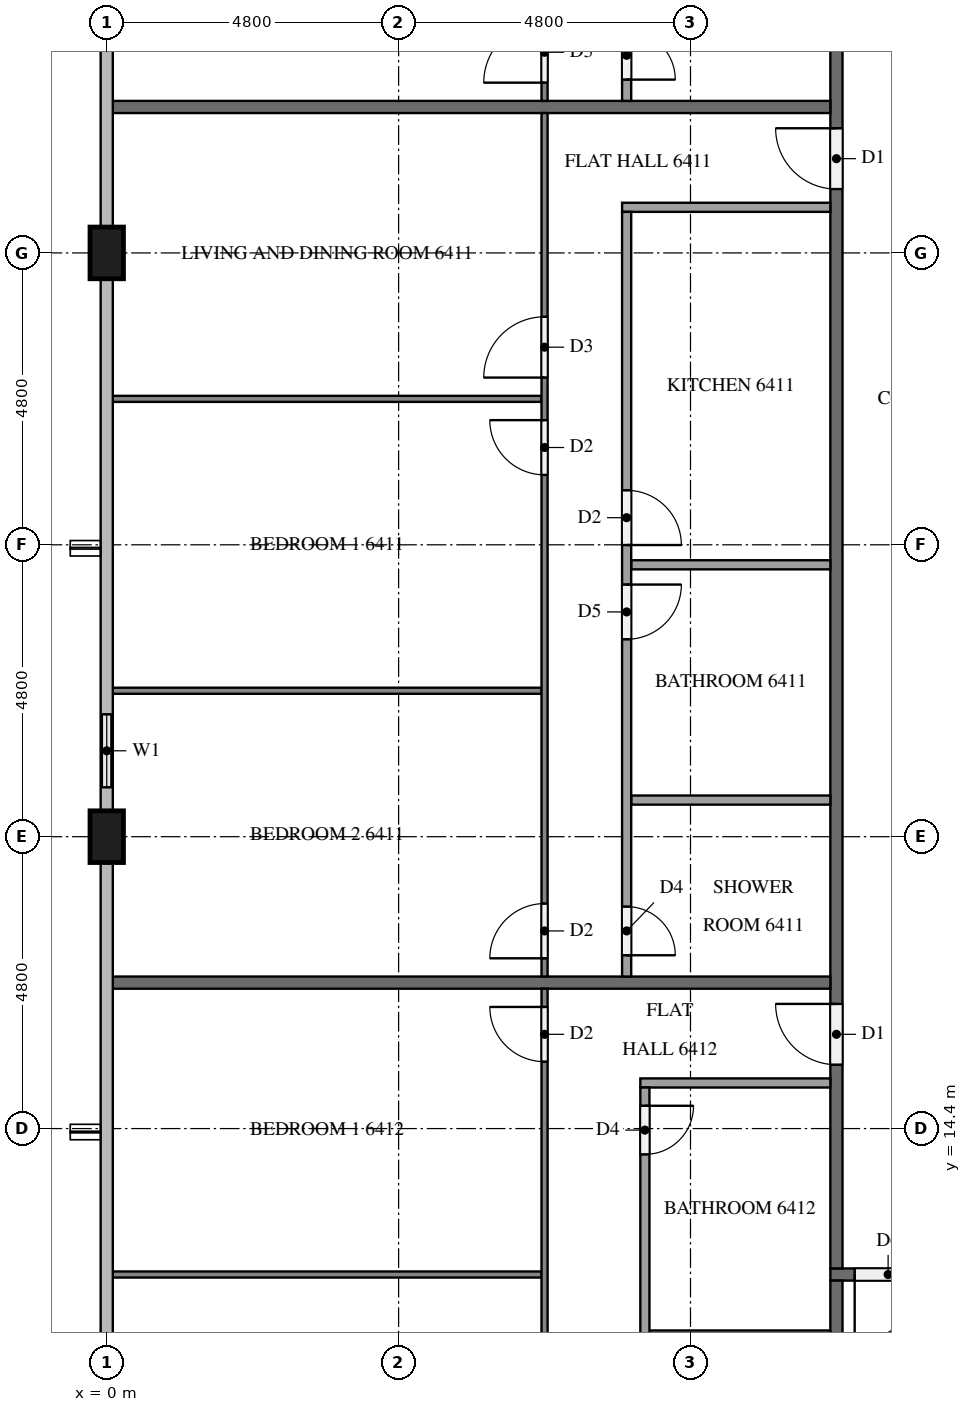
"""IFC4 building model, lengths in metres.
Left out: names, types, materials, properties, quantities, classifications, styles, units other than length and angle.
Written with IfcOpenShell. Run it as: python <this file> out.ifc"""

import sys

from ifc_helpers import new_model, si_unit, direction, frame, frame_2d, origin, origin_2d, place, context, subcontext, project, spatial, rectangle, extrude, element, fill, save


model = new_model("IFC4")
c1 = context("Model", 3, precision=1e-05, world=origin(), true_north=direction((0.0, 1.0)))
c2 = subcontext(c1, "Body", "Model", "MODEL_VIEW")
j1 = project(units=[si_unit("LENGTHUNIT", "METRE"), si_unit("PLANEANGLEUNIT", "RADIAN")], contexts=[c1])
p1 = place(None, origin())
s1 = spatial("IfcSite", under=j1, at=p1, CompositionType="ELEMENT")
p2 = place(p1, origin())
s2 = spatial("IfcBuilding", under=s1, at=p2, CompositionType="ELEMENT")
p3 = place(p2, frame((0.0, 0.0, 245.7)))
s3 = spatial("IfcBuildingStorey", under=s2, at=p3, CompositionType="ELEMENT", Elevation=245.7)
for number, where, z_axis, x_axis in (
    (1, (0.0, 28.8, 0.0), (0.0, 0.0, 1.0), (0.0, 1.0, 0.0)),
    (2, (0.0, 19.2, 0.0), (0.0, 0.0, 1.0), (0.0, 1.0, 0.0)),
):
    element("IfcColumn", number, at=place(p3, frame(where, z_axis=z_axis, x_axis=x_axis)), inside=s3, PredefinedType="COLUMN", context=c2, shape_type="SweptSolid", body=[
        extrude(rectangle(XDim=0.85, YDim=0.55, at=origin_2d()), origin(), (0.0, 0.0, 1.0), 3.2),
    ])
p4 = place(p3, frame((0.0, 21.6, 0.0), z_axis=(0.0, 0.0, 1.0), x_axis=(0.0, -1.0, 0.0)))
e3 = element("IfcWall", 3, at=p4, inside=s3, PredefinedType="SOLIDWALL", context=c2, shape_type="SweptSolid", body=[
    extrude(rectangle(XDim=1.975, YDim=0.15, at=frame_2d((0.988, 0.0))), origin(), (0.0, 0.0, 1.0), 3.2),
])
p5 = place(p4, frame((0.387, 0.0, 0.9)))
e4 = element("IfcOpeningElement", 4, at=p5, cuts=e3, PredefinedType="OPENING", context=c2, shape_type="SweptSolid", body=[
    extrude(rectangle(XDim=1.2, YDim=1.4, at=frame_2d((0.6, 0.7))), frame((0.0, 0.085, 0.0), z_axis=(0.0, -1.0, 0.0), x_axis=(1.0, 0.0, 0.0)), (0.0, 0.0, 1.0), 0.17),
])
p6 = place(p3, frame((50.5, 12.0, 0.0), z_axis=(0.0, 0.0, 1.0), x_axis=(-1.0, 0.0, 0.0)))
e5 = element("IfcWall", 5, at=p6, inside=s3, PredefinedType="PARTITIONING", context=c2, shape_type="SweptSolid", body=[
    extrude(rectangle(XDim=38.6, YDim=0.2, at=frame_2d((19.3, 0.0))), origin(), (0.0, 0.0, 1.0), 3.2),
])
p7 = place(p6, frame((37.1, 0.0, 0.0)))
e6 = element("IfcOpeningElement", 6, at=p7, cuts=e5, PredefinedType="OPENING", context=c2, shape_type="SweptSolid", body=[
    extrude(rectangle(XDim=1.1, YDim=2.1, at=frame_2d((0.55, 1.05))), frame((0.0, 0.11, 0.0), z_axis=(0.0, -1.0, 0.0), x_axis=(1.0, 0.0, 0.0)), (0.0, 0.0, 1.0), 0.22),
])
p8 = place(p6, frame((17.95, 0.0, 0.0)))
e7 = element("IfcOpeningElement", 7, at=p8, cuts=e5, PredefinedType="OPENING", context=c2, shape_type="SweptSolid", body=[
    extrude(rectangle(XDim=1.0, YDim=2.1, at=frame_2d((0.5, 1.05))), frame((0.0, 0.11, 0.0), z_axis=(0.0, -1.0, 0.0), x_axis=(1.0, 0.0, 0.0)), (0.0, 0.0, 1.0), 0.22),
])
p9 = place(p6, frame((8.35, 0.0, 0.0)))
e8 = element("IfcOpeningElement", 8, at=p9, cuts=e5, PredefinedType="OPENING", context=c2, shape_type="SweptSolid", body=[
    extrude(rectangle(XDim=1.0, YDim=2.1, at=frame_2d((0.5, 1.05))), frame((0.0, 0.11, 0.0), z_axis=(0.0, -1.0, 0.0), x_axis=(1.0, 0.0, 0.0)), (0.0, 0.0, 1.0), 0.22),
])
p10 = place(p3, frame((12.0, 12.1, 0.0), z_axis=(0.0, 0.0, 1.0), x_axis=(0.0, 1.0, 0.0)))
e9 = element("IfcWall", 9, at=p10, inside=s3, PredefinedType="PARTITIONING", context=c2, shape_type="SweptSolid", body=[
    extrude(rectangle(XDim=28.6, YDim=0.2, at=frame_2d((14.3, 0.0))), origin(), (0.0, 0.0, 1.0), 3.2),
])
p11 = place(p10, frame((27.35, 0.0, 0.0)))
e10 = element("IfcOpeningElement", 10, at=p11, cuts=e9, PredefinedType="OPENING", context=c2, shape_type="SweptSolid", body=[
    extrude(rectangle(XDim=1.0, YDim=2.1, at=frame_2d((0.5, 1.05))), frame((0.0, 0.11, 0.0), z_axis=(0.0, -1.0, 0.0), x_axis=(1.0, 0.0, 0.0)), (0.0, 0.0, 1.0), 0.22),
])
p12 = place(p10, frame((17.75, 0.0, 0.0)))
e11 = element("IfcOpeningElement", 11, at=p12, cuts=e9, PredefinedType="OPENING", context=c2, shape_type="SweptSolid", body=[
    extrude(rectangle(XDim=1.0, YDim=2.1, at=frame_2d((0.5, 1.05))), frame((0.0, 0.11, 0.0), z_axis=(0.0, -1.0, 0.0), x_axis=(1.0, 0.0, 0.0)), (0.0, 0.0, 1.0), 0.22),
])
p13 = place(p10, frame((3.35, 0.0, 0.0)))
e12 = element("IfcOpeningElement", 12, at=p13, cuts=e9, PredefinedType="OPENING", context=c2, shape_type="SweptSolid", body=[
    extrude(rectangle(XDim=1.0, YDim=2.1, at=frame_2d((0.5, 1.05))), frame((0.0, 0.11, 0.0), z_axis=(0.0, -1.0, 0.0), x_axis=(1.0, 0.0, 0.0)), (0.0, 0.0, 1.0), 0.22),
])
p14 = place(p3, frame((12.0, 4.9, 0.0), z_axis=(0.0, 0.0, 1.0), x_axis=(0.0, 1.0, 0.0)))
e13 = element("IfcWall", 13, at=p14, inside=s3, PredefinedType="PARTITIONING", context=c2, shape_type="SweptSolid", body=[
    extrude(rectangle(XDim=7.0, YDim=0.2, at=frame_2d((3.5, 0.0))), origin(), (0.0, 0.0, 1.0), 3.2),
])
for number, where, z_axis, x_axis in (
    (14, (0.1, 31.2, 0.0), (0.0, 0.0, 1.0), (1.0, 0.0, 0.0)),
    (15, (0.1, 16.8, 0.0), (0.0, 0.0, 1.0), (1.0, 0.0, 0.0)),
):
    element("IfcWall", number, at=place(p3, frame(where, z_axis=z_axis, x_axis=x_axis)), inside=s3, PredefinedType="PARTITIONING", context=c2, shape_type="SweptSolid", body=[
        extrude(rectangle(XDim=11.8, YDim=0.2, at=frame_2d((5.9, 0.0))), origin(), (0.0, 0.0, 1.0), 3.2),
    ])
p15 = place(p3, frame((7.2, 31.3, 0.0), z_axis=(0.0, 0.0, 1.0), x_axis=(0.0, 1.0, 0.0)))
e16 = element("IfcWall", 16, at=p15, inside=s3, PredefinedType="PARTITIONING", context=c2, shape_type="SweptSolid", body=[
    extrude(rectangle(XDim=9.4, YDim=0.1, at=frame_2d((4.7, 0.0))), origin(), (0.0, 0.0, 1.0), 3.2),
])
p16 = place(p15, frame((8.2, 0.0, 0.0)))
e17 = element("IfcOpeningElement", 17, at=p16, cuts=e16, PredefinedType="OPENING", context=c2, shape_type="SweptSolid", body=[
    extrude(rectangle(XDim=0.9, YDim=2.1, at=frame_2d((0.45, 1.05))), frame((0.0, 0.06, 0.0), z_axis=(0.0, -1.0, 0.0), x_axis=(1.0, 0.0, 0.0)), (0.0, 0.0, 1.0), 0.12),
])
p17 = place(p15, frame((0.3, 0.0, 0.0)))
e18 = element("IfcOpeningElement", 18, at=p17, cuts=e16, PredefinedType="OPENING", context=c2, shape_type="SweptSolid", body=[
    extrude(rectangle(XDim=1.0, YDim=2.1, at=frame_2d((0.5, 1.05))), frame((0.0, 0.06, 0.0), z_axis=(0.0, -1.0, 0.0), x_axis=(1.0, 0.0, 0.0)), (0.0, 0.0, 1.0), 0.12),
])
p18 = place(p3, frame((8.55, 39.075, 0.0), z_axis=(0.0, 0.0, 1.0), x_axis=(0.0, -1.0, 0.0)))
e19 = element("IfcWall", 19, at=p18, inside=s3, PredefinedType="PARTITIONING", context=c2, shape_type="SweptSolid", body=[
    extrude(rectangle(XDim=7.775, YDim=0.15, at=frame_2d((3.887, 0.0))), origin(), (0.0, 0.0, 1.0), 3.2),
])
p19 = place(p18, frame((0.3, 0.0, 0.0)))
e20 = element("IfcOpeningElement", 20, at=p19, cuts=e19, PredefinedType="OPENING", context=c2, shape_type="SweptSolid", body=[
    extrude(rectangle(XDim=0.9, YDim=2.1, at=frame_2d((0.45, 1.05))), frame((0.0, 0.085, 0.0), z_axis=(0.0, -1.0, 0.0), x_axis=(1.0, 0.0, 0.0)), (0.0, 0.0, 1.0), 0.17),
])
p20 = place(p18, frame((6.625, 0.0, 0.0)))
e21 = element("IfcOpeningElement", 21, at=p20, cuts=e19, PredefinedType="OPENING", context=c2, shape_type="SweptSolid", body=[
    extrude(rectangle(XDim=0.8, YDim=2.1, at=frame_2d((0.4, 1.05))), frame((0.0, 0.085, 0.0), z_axis=(0.0, -1.0, 0.0), x_axis=(1.0, 0.0, 0.0)), (0.0, 0.0, 1.0), 0.17),
])
for number, where, z_axis, x_axis in (
    (22, (7.15, 26.4, 0.0), (0.0, 0.0, 1.0), (-1.0, 0.0, 0.0)),
    (23, (7.15, 21.6, 0.0), (0.0, 0.0, 1.0), (-1.0, 0.0, 0.0)),
):
    element("IfcWall", number, at=place(p3, frame(where, z_axis=z_axis, x_axis=x_axis)), inside=s3, PredefinedType="PARTITIONING", context=c2, shape_type="SweptSolid", body=[
        extrude(rectangle(XDim=7.05, YDim=0.1, at=frame_2d((3.525, 0.0))), origin(), (0.0, 0.0, 1.0), 3.2),
    ])
p21 = place(p3, frame((7.2, 16.9, 0.0), z_axis=(0.0, 0.0, 1.0), x_axis=(0.0, 1.0, 0.0)))
e24 = element("IfcWall", 24, at=p21, inside=s3, PredefinedType="PARTITIONING", context=c2, shape_type="SweptSolid", body=[
    extrude(rectangle(XDim=14.2, YDim=0.1, at=frame_2d((7.1, 0.0))), origin(), (0.0, 0.0, 1.0), 3.2),
])
p22 = place(p21, frame((9.85, 0.0, 0.0)))
e25 = element("IfcOpeningElement", 25, at=p22, cuts=e24, PredefinedType="OPENING", context=c2, shape_type="SweptSolid", body=[
    extrude(rectangle(XDim=1.0, YDim=2.1, at=frame_2d((0.5, 1.05))), frame((0.0, 0.06, 0.0), z_axis=(0.0, -1.0, 0.0), x_axis=(1.0, 0.0, 0.0)), (0.0, 0.0, 1.0), 0.12),
])
p23 = place(p21, frame((8.25, 0.0, 0.0)))
e26 = element("IfcOpeningElement", 26, at=p23, cuts=e24, PredefinedType="OPENING", context=c2, shape_type="SweptSolid", body=[
    extrude(rectangle(XDim=0.9, YDim=2.1, at=frame_2d((0.45, 1.05))), frame((0.0, 0.06, 0.0), z_axis=(0.0, -1.0, 0.0), x_axis=(1.0, 0.0, 0.0)), (0.0, 0.0, 1.0), 0.12),
])
p24 = place(p21, frame((0.3, 0.0, 0.0)))
e27 = element("IfcOpeningElement", 27, at=p24, cuts=e24, PredefinedType="OPENING", context=c2, shape_type="SweptSolid", body=[
    extrude(rectangle(XDim=0.9, YDim=2.1, at=frame_2d((0.45, 1.05))), frame((0.0, 0.06, 0.0), z_axis=(0.0, -1.0, 0.0), x_axis=(1.0, 0.0, 0.0)), (0.0, 0.0, 1.0), 0.12),
])
for number, where, z_axis, x_axis in (
    (28, (11.9, 23.671, 0.0), (0.0, 0.0, 1.0), (-1.0, 0.0, 0.0)),
    (29, (11.9, 19.802, 0.0), (0.0, 0.0, 1.0), (-1.0, 0.0, 0.0)),
):
    element("IfcWall", number, at=place(p3, frame(where, z_axis=z_axis, x_axis=x_axis)), inside=s3, PredefinedType="PARTITIONING", context=c2, shape_type="SweptSolid", body=[
        extrude(rectangle(XDim=3.275, YDim=0.15, at=frame_2d((1.637, 0.0))), origin(), (0.0, 0.0, 1.0), 3.2),
    ])
p25 = place(p3, frame((11.9, 29.55, 0.0), z_axis=(0.0, 0.0, 1.0), x_axis=(-1.0, 0.0, 0.0)))
e30 = element("IfcWall", 30, at=p25, inside=s3, PredefinedType="PARTITIONING", context=c2, shape_type="SweptSolid", body=[
    extrude(rectangle(XDim=3.425, YDim=0.15, at=frame_2d((1.712, 0.0))), origin(), (0.0, 0.0, 1.0), 3.2),
])
p26 = place(p3, frame((8.55, 29.475, 0.0), z_axis=(0.0, 0.0, 1.0), x_axis=(0.0, -1.0, 0.0)))
e31 = element("IfcWall", 31, at=p26, inside=s3, PredefinedType="PARTITIONING", context=c2, shape_type="SweptSolid", body=[
    extrude(rectangle(XDim=12.575, YDim=0.15, at=frame_2d((6.288, 0.0))), origin(), (0.0, 0.0, 1.0), 3.2),
])
p27 = place(p26, frame((4.579, 0.0, 0.0)))
e32 = element("IfcOpeningElement", 32, at=p27, cuts=e31, PredefinedType="OPENING", context=c2, shape_type="SweptSolid", body=[
    extrude(rectangle(XDim=0.9, YDim=2.1, at=frame_2d((0.45, 1.05))), frame((0.0, 0.085, 0.0), z_axis=(0.0, -1.0, 0.0), x_axis=(1.0, 0.0, 0.0)), (0.0, 0.0, 1.0), 0.17),
])
p28 = place(p26, frame((6.129, 0.0, 0.0)))
e33 = element("IfcOpeningElement", 33, at=p28, cuts=e31, PredefinedType="OPENING", context=c2, shape_type="SweptSolid", body=[
    extrude(rectangle(XDim=0.9, YDim=2.1, at=frame_2d((0.45, 1.05))), frame((0.0, 0.085, 0.0), z_axis=(0.0, -1.0, 0.0), x_axis=(1.0, 0.0, 0.0)), (0.0, 0.0, 1.0), 0.17),
])
p29 = place(p26, frame((11.425, 0.0, 0.0)))
e34 = element("IfcOpeningElement", 34, at=p29, cuts=e31, PredefinedType="OPENING", context=c2, shape_type="SweptSolid", body=[
    extrude(rectangle(XDim=0.8, YDim=2.1, at=frame_2d((0.4, 1.05))), frame((0.0, 0.085, 0.0), z_axis=(0.0, -1.0, 0.0), x_axis=(1.0, 0.0, 0.0)), (0.0, 0.0, 1.0), 0.17),
])
p30 = place(p3, frame((7.15, 12.0, 0.0), z_axis=(0.0, 0.0, 1.0), x_axis=(-1.0, 0.0, 0.0)))
e35 = element("IfcWall", 35, at=p30, inside=s3, PredefinedType="PARTITIONING", context=c2, shape_type="SweptSolid", body=[
    extrude(rectangle(XDim=7.05, YDim=0.1, at=frame_2d((3.525, 0.0))), origin(), (0.0, 0.0, 1.0), 3.2),
])
p31 = place(p3, frame((7.2, 4.9, 0.0), z_axis=(0.0, 0.0, 1.0), x_axis=(0.0, 1.0, 0.0)))
e36 = element("IfcWall", 36, at=p31, inside=s3, PredefinedType="PARTITIONING", context=c2, shape_type="SweptSolid", body=[
    extrude(rectangle(XDim=11.8, YDim=0.1, at=frame_2d((5.9, 0.0))), origin(), (0.0, 0.0, 1.0), 3.2),
])
p32 = place(p31, frame((10.6, 0.0, 0.0)))
e37 = element("IfcOpeningElement", 37, at=p32, cuts=e36, PredefinedType="OPENING", context=c2, shape_type="SweptSolid", body=[
    extrude(rectangle(XDim=0.9, YDim=2.1, at=frame_2d((0.45, 1.05))), frame((0.0, 0.06, 0.0), z_axis=(0.0, -1.0, 0.0), x_axis=(1.0, 0.0, 0.0)), (0.0, 0.0, 1.0), 0.12),
])
p33 = place(p31, frame((0.3, 0.0, 0.0)))
e38 = element("IfcOpeningElement", 38, at=p33, cuts=e36, PredefinedType="OPENING", context=c2, shape_type="SweptSolid", body=[
    extrude(rectangle(XDim=1.0, YDim=2.1, at=frame_2d((0.5, 1.05))), frame((0.0, 0.06, 0.0), z_axis=(0.0, -1.0, 0.0), x_axis=(1.0, 0.0, 0.0)), (0.0, 0.0, 1.0), 0.12),
])
p34 = place(p3, frame((11.9, 11.005, 0.0), z_axis=(0.0, 0.0, 1.0), x_axis=(-1.0, 0.0, 0.0)))
e39 = element("IfcWall", 39, at=p34, inside=s3, PredefinedType="PARTITIONING", context=c2, shape_type="SweptSolid", body=[
    extrude(rectangle(XDim=2.975, YDim=0.15, at=frame_2d((1.487, 0.0))), origin(), (0.0, 0.0, 1.0), 3.2),
])
p35 = place(p3, frame((11.9, 15.15, 0.0), z_axis=(0.0, 0.0, 1.0), x_axis=(-1.0, 0.0, 0.0)))
e40 = element("IfcWall", 40, at=p35, inside=s3, PredefinedType="PARTITIONING", context=c2, shape_type="SweptSolid", body=[
    extrude(rectangle(XDim=3.125, YDim=0.15, at=frame_2d((1.562, 0.0))), origin(), (0.0, 0.0, 1.0), 3.2),
])
p36 = place(p3, frame((8.85, 15.075, 0.0), z_axis=(0.0, 0.0, 1.0), x_axis=(0.0, -1.0, 0.0)))
e41 = element("IfcWall", 41, at=p36, inside=s3, PredefinedType="PARTITIONING", context=c2, shape_type="SweptSolid", body=[
    extrude(rectangle(XDim=10.175, YDim=0.15, at=frame_2d((5.087, 0.0))), origin(), (0.0, 0.0, 1.0), 3.2),
])
p37 = place(p36, frame((0.3, 0.0, 0.0)))
e42 = element("IfcOpeningElement", 42, at=p37, cuts=e41, PredefinedType="OPENING", context=c2, shape_type="SweptSolid", body=[
    extrude(rectangle(XDim=0.8, YDim=2.1, at=frame_2d((0.4, 1.05))), frame((0.0, 0.085, 0.0), z_axis=(0.0, -1.0, 0.0), x_axis=(1.0, 0.0, 0.0)), (0.0, 0.0, 1.0), 0.17),
])
p38 = place(p36, frame((8.925, 0.0, 0.0)))
e43 = element("IfcOpeningElement", 43, at=p38, cuts=e41, PredefinedType="OPENING", context=c2, shape_type="SweptSolid", body=[
    extrude(rectangle(XDim=0.9, YDim=2.1, at=frame_2d((0.45, 1.05))), frame((0.0, 0.085, 0.0), z_axis=(0.0, -1.0, 0.0), x_axis=(1.0, 0.0, 0.0)), (0.0, 0.0, 1.0), 0.17),
])
p39 = place(p5, origin())
e44 = element("IfcWindow", 44, at=p39, inside=s3, PartitioningType="SINGLE_PANEL", PredefinedType="WINDOW", context=c2, shape_type="SweptSolid", body=[
    extrude(rectangle(XDim=1.2, YDim=1.4, at=frame_2d((0.6, 0.7))), frame((0.0, 0.03, 0.0), z_axis=(0.0, -1.0, 0.0), x_axis=(1.0, 0.0, 0.0)), (0.0, 0.0, 1.0), 0.06),
])
fill(e4, e44)
p40 = place(p7, origin())
e45 = element("IfcDoor", 45, at=p40, inside=s3, OperationType="SINGLE_SWING_RIGHT", PredefinedType="DOOR", context=c2, shape_type="SweptSolid", body=[
    extrude(rectangle(XDim=1.1, YDim=2.1, at=frame_2d((0.55, 1.05))), frame((0.0, 0.025, 0.0), z_axis=(0.0, -1.0, 0.0), x_axis=(1.0, 0.0, 0.0)), (0.0, 0.0, 1.0), 0.05),
])
fill(e6, e45)
p41 = place(p12, origin())
e46 = element("IfcDoor", 46, at=p41, inside=s3, OperationType="SINGLE_SWING_RIGHT", PredefinedType="DOOR", context=c2, shape_type="SweptSolid", body=[
    extrude(rectangle(XDim=1.0, YDim=2.1, at=frame_2d((0.5, 1.05))), frame((0.0, 0.025, 0.0), z_axis=(0.0, -1.0, 0.0), x_axis=(1.0, 0.0, 0.0)), (0.0, 0.0, 1.0), 0.05),
])
fill(e11, e46)
p42 = place(p13, origin())
e47 = element("IfcDoor", 47, at=p42, inside=s3, OperationType="SINGLE_SWING_RIGHT", PredefinedType="DOOR", context=c2, shape_type="SweptSolid", body=[
    extrude(rectangle(XDim=1.0, YDim=2.1, at=frame_2d((0.5, 1.05))), frame((0.0, 0.025, 0.0), z_axis=(0.0, -1.0, 0.0), x_axis=(1.0, 0.0, 0.0)), (0.0, 0.0, 1.0), 0.05),
])
fill(e12, e47)
p43 = place(p17, origin())
e48 = element("IfcDoor", 48, at=p43, inside=s3, OperationType="SINGLE_SWING_LEFT", PredefinedType="DOOR", context=c2, shape_type="SweptSolid", body=[
    extrude(rectangle(XDim=1.0, YDim=2.1, at=frame_2d((0.5, 1.05))), frame((0.0, 0.025, 0.0), z_axis=(0.0, -1.0, 0.0), x_axis=(1.0, 0.0, 0.0)), (0.0, 0.0, 1.0), 0.05),
])
fill(e18, e48)
p44 = place(p20, origin())
e49 = element("IfcDoor", 49, at=p44, inside=s3, OperationType="SINGLE_SWING_RIGHT", PredefinedType="DOOR", context=c2, shape_type="SweptSolid", body=[
    extrude(rectangle(XDim=0.8, YDim=2.1, at=frame_2d((0.4, 1.05))), frame((0.0, 0.025, 0.0), z_axis=(0.0, -1.0, 0.0), x_axis=(1.0, 0.0, 0.0)), (0.0, 0.0, 1.0), 0.05),
])
fill(e21, e49)
p45 = place(p22, origin())
e50 = element("IfcDoor", 50, at=p45, inside=s3, OperationType="SINGLE_SWING_LEFT", PredefinedType="DOOR", context=c2, shape_type="SweptSolid", body=[
    extrude(rectangle(XDim=1.0, YDim=2.1, at=frame_2d((0.5, 1.05))), frame((0.0, 0.025, 0.0), z_axis=(0.0, -1.0, 0.0), x_axis=(1.0, 0.0, 0.0)), (0.0, 0.0, 1.0), 0.05),
])
fill(e25, e50)
p46 = place(p23, origin())
e51 = element("IfcDoor", 51, at=p46, inside=s3, OperationType="SINGLE_SWING_RIGHT", PredefinedType="DOOR", context=c2, shape_type="SweptSolid", body=[
    extrude(rectangle(XDim=0.9, YDim=2.1, at=frame_2d((0.45, 1.05))), frame((0.0, 0.025, 0.0), z_axis=(0.0, -1.0, 0.0), x_axis=(1.0, 0.0, 0.0)), (0.0, 0.0, 1.0), 0.05),
])
fill(e26, e51)
p47 = place(p24, origin())
e52 = element("IfcDoor", 52, at=p47, inside=s3, OperationType="SINGLE_SWING_LEFT", PredefinedType="DOOR", context=c2, shape_type="SweptSolid", body=[
    extrude(rectangle(XDim=0.9, YDim=2.1, at=frame_2d((0.45, 1.05))), frame((0.0, 0.025, 0.0), z_axis=(0.0, -1.0, 0.0), x_axis=(1.0, 0.0, 0.0)), (0.0, 0.0, 1.0), 0.05),
])
fill(e27, e52)
p48 = place(p27, origin())
e53 = element("IfcDoor", 53, at=p48, inside=s3, OperationType="SINGLE_SWING_RIGHT", PredefinedType="DOOR", context=c2, shape_type="SweptSolid", body=[
    extrude(rectangle(XDim=0.9, YDim=2.1, at=frame_2d((0.45, 1.05))), frame((0.0, 0.025, 0.0), z_axis=(0.0, -1.0, 0.0), x_axis=(1.0, 0.0, 0.0)), (0.0, 0.0, 1.0), 0.05),
])
fill(e32, e53)
p49 = place(p28, origin())
e54 = element("IfcDoor", 54, at=p49, inside=s3, OperationType="SINGLE_SWING_LEFT", PredefinedType="DOOR", context=c2, shape_type="SweptSolid", body=[
    extrude(rectangle(XDim=0.9, YDim=2.1, at=frame_2d((0.45, 1.05))), frame((0.0, 0.025, 0.0), z_axis=(0.0, -1.0, 0.0), x_axis=(1.0, 0.0, 0.0)), (0.0, 0.0, 1.0), 0.05),
])
fill(e33, e54)
p50 = place(p29, origin())
e55 = element("IfcDoor", 55, at=p50, inside=s3, OperationType="SINGLE_SWING_RIGHT", PredefinedType="DOOR", context=c2, shape_type="SweptSolid", body=[
    extrude(rectangle(XDim=0.8, YDim=2.1, at=frame_2d((0.4, 1.05))), frame((0.0, 0.025, 0.0), z_axis=(0.0, -1.0, 0.0), x_axis=(1.0, 0.0, 0.0)), (0.0, 0.0, 1.0), 0.05),
])
fill(e34, e55)
p51 = place(p32, origin())
e56 = element("IfcDoor", 56, at=p51, inside=s3, OperationType="SINGLE_SWING_RIGHT", PredefinedType="DOOR", context=c2, shape_type="SweptSolid", body=[
    extrude(rectangle(XDim=0.9, YDim=2.1, at=frame_2d((0.45, 1.05))), frame((0.0, 0.025, 0.0), z_axis=(0.0, -1.0, 0.0), x_axis=(1.0, 0.0, 0.0)), (0.0, 0.0, 1.0), 0.05),
])
fill(e37, e56)
p52 = place(p37, origin())
e57 = element("IfcDoor", 57, at=p52, inside=s3, OperationType="SINGLE_SWING_LEFT", PredefinedType="DOOR", context=c2, shape_type="SweptSolid", body=[
    extrude(rectangle(XDim=0.8, YDim=2.1, at=frame_2d((0.4, 1.05))), frame((0.0, 0.025, 0.0), z_axis=(0.0, -1.0, 0.0), x_axis=(1.0, 0.0, 0.0)), (0.0, 0.0, 1.0), 0.05),
])
fill(e42, e57)
save(model, sys.argv[1])
